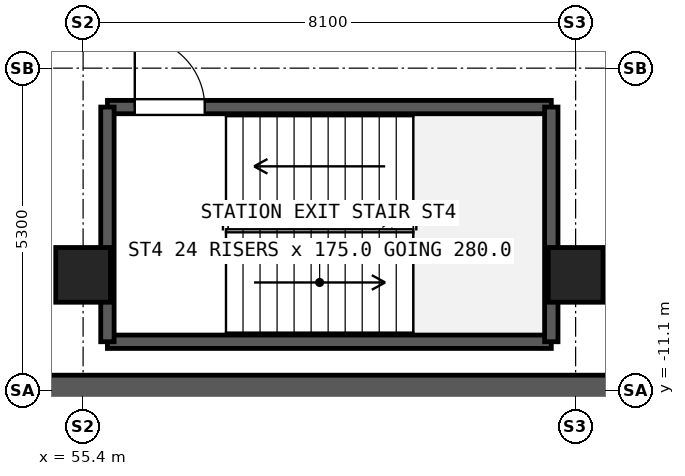
"""IFC4 building model, lengths in metres.
Left out: names, types, materials, properties, quantities, classifications, styles, units other than length and angle.
Written with IfcOpenShell. Run it as: python <this file> out.ifc"""

import sys

from ifc_helpers import new_model, si_unit, direction, frame, frame_2d, origin, origin_2d, place, context, subcontext, project, spatial, rectangle, hollow_rectangle, extrude, source, transform, mapped, element, fill, save


model = new_model("IFC4")
c1 = context("Model", 3, precision=1e-05, world=origin(), true_north=direction((0.0, 1.0)))
c2 = subcontext(c1, "Body", "Model", "MODEL_VIEW")
j1 = project(units=[si_unit("LENGTHUNIT", "METRE"), si_unit("PLANEANGLEUNIT", "RADIAN")], contexts=[c1])
p1 = place(None, origin())
s1 = spatial("IfcSite", under=j1, at=p1, CompositionType="ELEMENT")
p2 = place(p1, origin())
s2 = spatial("IfcBuilding", under=s1, at=p2, CompositionType="ELEMENT")
p3 = place(p2, frame((0.0, 0.0, -4.2)))
s3 = spatial("IfcBuildingStorey", under=s2, at=p3, CompositionType="ELEMENT", Elevation=-4.2)
m1 = source(origin(), c2, "Body", "SweptSolid", [
    extrude(hollow_rectangle(XDim=0.7, YDim=0.9, WallThickness=0.04, at=origin_2d()), origin(), (0.0, 0.0, 1.0), 3.88),
])
for number, where, z_axis, x_axis in (
    (1, (55.4, -9.2, 0.0), (0.0, 0.0, 1.0), (1.0, 0.0, 0.0)),
    (2, (63.5, -9.2, 0.0), (0.0, 0.0, 1.0), (1.0, 0.0, 0.0)),
):
    element("IfcColumn", number, at=place(p3, frame(where, z_axis=z_axis, x_axis=x_axis)), inside=s3, PredefinedType="COLUMN", context=c2, shape_type="MappedRepresentation", body=[
        mapped(m1, transform((0.0, 0.0, 0.0), x_axis=(1.0, 0.0, 0.0), y_axis=(0.0, 1.0, 0.0), z_axis=(0.0, 0.0, 1.0), scale=1.0)),
    ])
p4 = place(p3, frame((0.0, -11.1, 0.0), z_axis=(0.0, 0.0, 1.0), x_axis=(1.0, 0.0, 0.0)))
e3 = element("IfcWall", 3, at=p4, inside=s3, PredefinedType="USERDEFINED", context=c2, shape_type="SweptSolid", body=[
    extrude(rectangle(XDim=71.6, YDim=0.5, at=frame_2d((35.8, 0.0))), origin(), (0.0, 0.0, 1.0), 3.88),
])
p5 = place(p3, frame((55.8, -10.3, 0.0), z_axis=(0.0, 0.0, 1.0), x_axis=(1.0, 0.0, 0.0)))
e4 = element("IfcWall", 4, at=p5, inside=s3, PredefinedType="SOLIDWALL", context=c2, shape_type="SweptSolid", body=[
    extrude(rectangle(XDim=7.3, YDim=0.22, at=frame_2d((3.65, 0.0))), origin(), (0.0, 0.0, 1.0), 3.88),
])
p6 = place(p3, frame((55.8, -6.44, 0.0), z_axis=(0.0, 0.0, 1.0), x_axis=(1.0, 0.0, 0.0)))
e5 = element("IfcWall", 5, at=p6, inside=s3, PredefinedType="SOLIDWALL", context=c2, shape_type="SweptSolid", body=[
    extrude(rectangle(XDim=7.3, YDim=0.22, at=frame_2d((3.65, 0.0))), origin(), (0.0, 0.0, 1.0), 3.88),
])
p7 = place(p6, frame((0.45, 0.0, 0.0)))
e6 = element("IfcOpeningElement", 6, at=p7, cuts=e5, PredefinedType="OPENING", context=c2, shape_type="SweptSolid", body=[
    extrude(rectangle(XDim=1.15, YDim=2.2, at=frame_2d((0.575, 1.1))), frame((0.0, 0.12, 0.0), z_axis=(0.0, -1.0, 0.0), x_axis=(1.0, 0.0, 0.0)), (0.0, 0.0, 1.0), 0.24),
])
for number, where, z_axis, x_axis in (
    (7, (55.8, -10.3, 0.0), (0.0, 0.0, 1.0), (0.0, 1.0, 0.0)),
    (8, (63.1, -10.3, 0.0), (0.0, 0.0, 1.0), (0.0, 1.0, 0.0)),
):
    element("IfcWall", number, at=place(p3, frame(where, z_axis=z_axis, x_axis=x_axis)), inside=s3, PredefinedType="SOLIDWALL", context=c2, shape_type="SweptSolid", body=[
        extrude(rectangle(XDim=3.86, YDim=0.22, at=frame_2d((1.93, 0.0))), origin(), (0.0, 0.0, 1.0), 3.88),
    ])
p8 = place(p7, origin())
e9 = element("IfcDoor", 9, at=p8, inside=s3, OperationType="SINGLE_SWING_LEFT", PredefinedType="DOOR", context=c2, shape_type="SweptSolid", body=[
    extrude(rectangle(XDim=1.15, YDim=2.2, at=frame_2d((0.575, 1.1))), frame((0.0, 0.025, 0.0), z_axis=(0.0, -1.0, 0.0), x_axis=(1.0, 0.0, 0.0)), (0.0, 0.0, 1.0), 0.05),
])
fill(e6, e9)
save(model, sys.argv[1])
